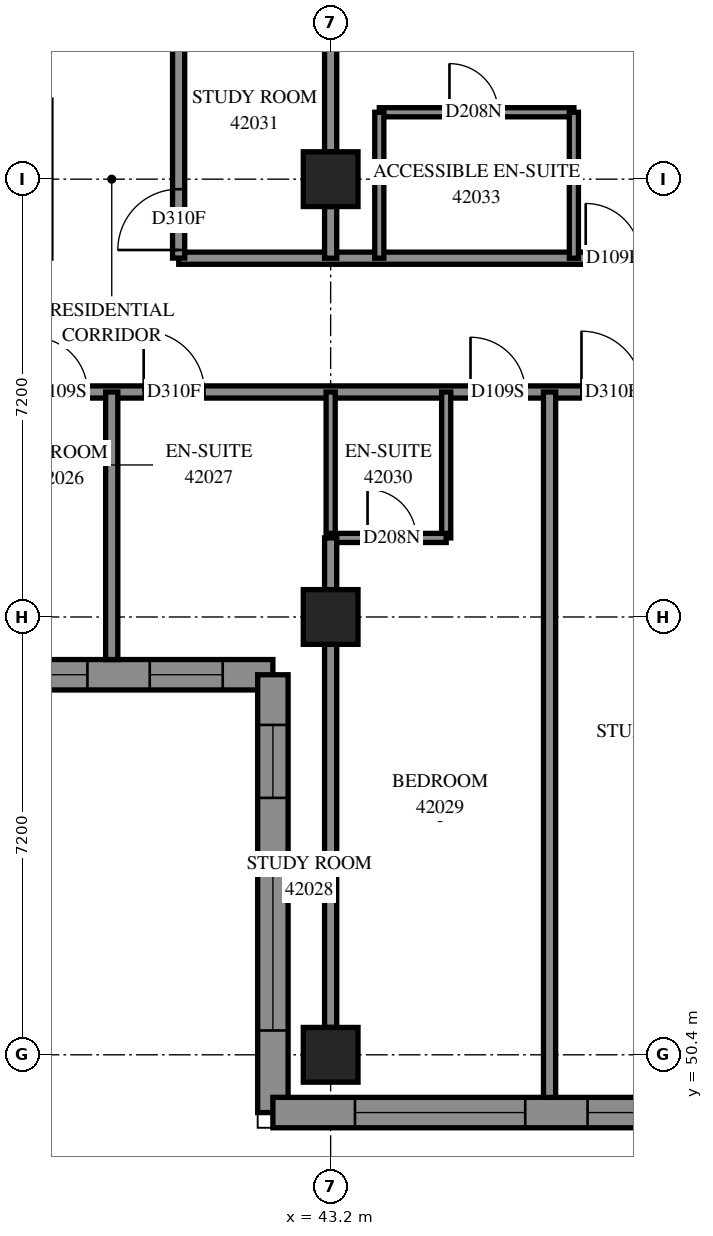
"""IFC4 building model, lengths in metres.
Left out: names, types, materials, properties, quantities, classifications, styles, units other than length and angle.
Written with IfcOpenShell. Run it as: python <this file> out.ifc"""

import sys

from ifc_helpers import new_model, si_unit, direction, frame, frame_2d, origin, origin_2d, place, context, subcontext, project, spatial, polyline, rectangle, outline, extrude, element, fill, save


model = new_model("IFC4")
c1 = context("Model", 3, precision=1e-05, world=origin(), true_north=direction((0.0, 1.0)))
c2 = subcontext(c1, "Body", "Model", "MODEL_VIEW")
j1 = project(units=[si_unit("LENGTHUNIT", "METRE"), si_unit("PLANEANGLEUNIT", "RADIAN")], contexts=[c1])
p1 = place(None, origin())
s1 = spatial("IfcSite", under=j1, at=p1, CompositionType="ELEMENT")
p2 = place(p1, origin())
s2 = spatial("IfcBuilding", under=s1, at=p2, CompositionType="ELEMENT")
p3 = place(p2, frame((0.0, 0.0, 155.8)))
s3 = spatial("IfcBuildingStorey", under=s2, at=p3, CompositionType="ELEMENT", Elevation=155.8)
for number, where, z_axis, x_axis in (
    (1, (43.2, 50.4, 0.0), (0.0, 0.0, 1.0), (1.0, 0.0, 0.0)),
    (2, (43.2, 57.6, 0.0), (0.0, 0.0, 1.0), (1.0, 0.0, 0.0)),
    (3, (43.2, 64.8, 0.0), (0.0, 0.0, 1.0), (1.0, 0.0, 0.0)),
):
    element("IfcColumn", number, at=place(p3, frame(where, z_axis=z_axis, x_axis=x_axis)), inside=s3, PredefinedType="COLUMN", context=c2, shape_type="SweptSolid", body=[
        extrude(rectangle(XDim=0.9, YDim=0.9, at=origin_2d()), origin(), (0.0, 0.0, 1.0), 3.1),
    ])
p4 = place(p3, frame((35.05, 56.65, 0.0), z_axis=(0.0, 0.0, 1.0), x_axis=(1.0, 0.0, 0.0)))
e4 = element("IfcWall", 4, at=p4, inside=s3, PredefinedType="SOLIDWALL", context=c2, shape_type="SweptSolid", body=[
    extrude(outline(polyline([(-0.25, -0.25), (6.95, -0.25), (7.45, 0.25), (0.25, 0.25), (-0.25, -0.25)])), origin(), (0.0, 0.0, 1.0), 3.1),
])
p5 = place(p4, frame((1.35, 0.0, 0.45)))
e5 = element("IfcOpeningElement", 5, at=p5, cuts=e4, PredefinedType="OPENING", context=c2, shape_type="SweptSolid", body=[
    extrude(rectangle(XDim=2.8, YDim=2.5, at=frame_2d((1.4, 1.25))), frame((0.0, 0.26, 0.0), z_axis=(0.0, -1.0, 0.0), x_axis=(1.0, 0.0, 0.0)), (0.0, 0.0, 1.0), 0.52),
])
p6 = place(p4, frame((5.175, 0.0, 0.45)))
e6 = element("IfcOpeningElement", 6, at=p6, cuts=e4, PredefinedType="OPENING", context=c2, shape_type="SweptSolid", body=[
    extrude(rectangle(XDim=1.2, YDim=2.5, at=frame_2d((0.6, 1.25))), frame((0.0, 0.26, 0.0), z_axis=(0.0, -1.0, 0.0), x_axis=(1.0, 0.0, 0.0)), (0.0, 0.0, 1.0), 0.52),
])
p7 = place(p3, frame((42.25, 56.65, 0.0), z_axis=(0.0, 0.0, 1.0), x_axis=(0.0, -1.0, 0.0)))
e7 = element("IfcWall", 7, at=p7, inside=s3, PredefinedType="SOLIDWALL", context=c2, shape_type="SweptSolid", body=[
    extrude(outline(polyline([(0.25, -0.25), (7.45, -0.25), (6.95, 0.25), (-0.25, 0.25), (0.25, -0.25)])), origin(), (0.0, 0.0, 1.0), 3.1),
])
p8 = place(p7, frame((3.05, 0.0, 0.45)))
e8 = element("IfcOpeningElement", 8, at=p8, cuts=e7, PredefinedType="OPENING", context=c2, shape_type="SweptSolid", body=[
    extrude(rectangle(XDim=2.8, YDim=2.5, at=frame_2d((1.4, 1.25))), frame((0.0, 0.26, 0.0), z_axis=(0.0, -1.0, 0.0), x_axis=(1.0, 0.0, 0.0)), (0.0, 0.0, 1.0), 0.52),
])
p9 = place(p7, frame((0.825, 0.0, 0.45)))
e9 = element("IfcOpeningElement", 9, at=p9, cuts=e7, PredefinedType="OPENING", context=c2, shape_type="SweptSolid", body=[
    extrude(rectangle(XDim=1.2, YDim=2.5, at=frame_2d((0.6, 1.25))), frame((0.0, 0.26, 0.0), z_axis=(0.0, -1.0, 0.0), x_axis=(1.0, 0.0, 0.0)), (0.0, 0.0, 1.0), 0.52),
])
p10 = place(p3, frame((42.25, 49.45, 0.0), z_axis=(0.0, 0.0, 1.0), x_axis=(1.0, 0.0, 0.0)))
e10 = element("IfcWall", 10, at=p10, inside=s3, PredefinedType="SOLIDWALL", context=c2, shape_type="SweptSolid", body=[
    extrude(outline(polyline([(-0.25, -0.25), (6.95, -0.25), (7.45, 0.25), (0.25, 0.25), (-0.25, -0.25)])), origin(), (0.0, 0.0, 1.0), 3.1),
])
p11 = place(p10, frame((1.35, 0.0, 0.45)))
e11 = element("IfcOpeningElement", 11, at=p11, cuts=e10, PredefinedType="OPENING", context=c2, shape_type="SweptSolid", body=[
    extrude(rectangle(XDim=2.8, YDim=2.5, at=frame_2d((1.4, 1.25))), frame((0.0, 0.26, 0.0), z_axis=(0.0, -1.0, 0.0), x_axis=(1.0, 0.0, 0.0)), (0.0, 0.0, 1.0), 0.52),
])
p12 = place(p10, frame((5.175, 0.0, 0.45)))
e12 = element("IfcOpeningElement", 12, at=p12, cuts=e10, PredefinedType="OPENING", context=c2, shape_type="SweptSolid", body=[
    extrude(rectangle(XDim=1.2, YDim=2.5, at=frame_2d((0.6, 1.25))), frame((0.0, 0.26, 0.0), z_axis=(0.0, -1.0, 0.0), x_axis=(1.0, 0.0, 0.0)), (0.0, 0.0, 1.0), 0.52),
])
p13 = place(p3, frame((36.0, 61.3, 0.0), z_axis=(0.0, 0.0, 1.0), x_axis=(1.0, 0.0, 0.0)))
e13 = element("IfcWall", 13, at=p13, inside=s3, PredefinedType="PARTITIONING", context=c2, shape_type="SweptSolid", body=[
    extrude(rectangle(XDim=16.9, YDim=0.2, at=frame_2d((8.45, 0.0))), origin(), (0.0, 0.0, 1.0), 3.1),
])
p14 = place(p13, frame((2.3, 0.0, 0.0)))
e14 = element("IfcOpeningElement", 14, at=p14, cuts=e13, PredefinedType="OPENING", context=c2, shape_type="SweptSolid", body=[
    extrude(rectangle(XDim=0.9, YDim=2.1, at=frame_2d((0.45, 1.05))), frame((0.0, 0.11, 0.0), z_axis=(0.0, -1.0, 0.0), x_axis=(1.0, 0.0, 0.0)), (0.0, 0.0, 1.0), 0.22),
])
p15 = place(p13, frame((4.125, 0.0, 0.0)))
e15 = element("IfcOpeningElement", 15, at=p15, cuts=e13, PredefinedType="OPENING", context=c2, shape_type="SweptSolid", body=[
    extrude(rectangle(XDim=1.0, YDim=2.1, at=frame_2d((0.5, 1.05))), frame((0.0, 0.11, 0.0), z_axis=(0.0, -1.0, 0.0), x_axis=(1.0, 0.0, 0.0)), (0.0, 0.0, 1.0), 0.22),
])
p16 = place(p13, frame((9.5, 0.0, 0.0)))
e16 = element("IfcOpeningElement", 16, at=p16, cuts=e13, PredefinedType="OPENING", context=c2, shape_type="SweptSolid", body=[
    extrude(rectangle(XDim=0.9, YDim=2.1, at=frame_2d((0.45, 1.05))), frame((0.0, 0.11, 0.0), z_axis=(0.0, -1.0, 0.0), x_axis=(1.0, 0.0, 0.0)), (0.0, 0.0, 1.0), 0.22),
])
p17 = place(p13, frame((11.325, 0.0, 0.0)))
e17 = element("IfcOpeningElement", 17, at=p17, cuts=e13, PredefinedType="OPENING", context=c2, shape_type="SweptSolid", body=[
    extrude(rectangle(XDim=1.0, YDim=2.1, at=frame_2d((0.5, 1.05))), frame((0.0, 0.11, 0.0), z_axis=(0.0, -1.0, 0.0), x_axis=(1.0, 0.0, 0.0)), (0.0, 0.0, 1.0), 0.22),
])
p18 = place(p13, frame((15.647, 0.0, 0.0)))
e18 = element("IfcOpeningElement", 18, at=p18, cuts=e13, PredefinedType="OPENING", context=c2, shape_type="SweptSolid", body=[
    extrude(rectangle(XDim=1.0, YDim=2.1, at=frame_2d((0.5, 1.05))), frame((0.0, 0.11, 0.0), z_axis=(0.0, -1.0, 0.0), x_axis=(1.0, 0.0, 0.0)), (0.0, 0.0, 1.0), 0.22),
])
p19 = place(p3, frame((40.702, 63.5, 0.0), z_axis=(0.0, 0.0, 1.0), x_axis=(1.0, 0.0, 0.0)))
e19 = element("IfcWall", 19, at=p19, inside=s3, PredefinedType="PARTITIONING", context=c2, shape_type="SweptSolid", body=[
    extrude(rectangle(XDim=14.198, YDim=0.2, at=frame_2d((7.099, 0.0))), origin(), (0.0, 0.0, 1.0), 3.1),
])
p20 = place(p19, frame((6.692, 0.0, 0.0)))
e20 = element("IfcOpeningElement", 20, at=p20, cuts=e19, PredefinedType="OPENING", context=c2, shape_type="SweptSolid", body=[
    extrude(rectangle(XDim=0.9, YDim=2.1, at=frame_2d((0.45, 1.05))), frame((0.0, 0.11, 0.0), z_axis=(0.0, -1.0, 0.0), x_axis=(1.0, 0.0, 0.0)), (0.0, 0.0, 1.0), 0.22),
])
p21 = place(p19, frame((10.25, 0.0, 0.0)))
e21 = element("IfcOpeningElement", 21, at=p21, cuts=e19, PredefinedType="OPENING", context=c2, shape_type="SweptSolid", body=[
    extrude(rectangle(XDim=0.9, YDim=2.1, at=frame_2d((0.45, 1.05))), frame((0.0, 0.11, 0.0), z_axis=(0.0, -1.0, 0.0), x_axis=(1.0, 0.0, 0.0)), (0.0, 0.0, 1.0), 0.22),
])
p22 = place(p3, frame((46.8, 49.7, 0.0), z_axis=(0.0, 0.0, 1.0), x_axis=(0.0, 1.0, 0.0)))
e22 = element("IfcWall", 22, at=p22, inside=s3, PredefinedType="PARTITIONING", context=c2, shape_type="SweptSolid", body=[
    extrude(rectangle(XDim=11.6, YDim=0.2, at=frame_2d((5.8, 0.0))), origin(), (0.0, 0.0, 1.0), 3.1),
])
p23 = place(p3, frame((43.2, 50.85, 0.0), z_axis=(0.0, 0.0, 1.0), x_axis=(0.0, 1.0, 0.0)))
e23 = element("IfcWall", 23, at=p23, inside=s3, PredefinedType="PARTITIONING", context=c2, shape_type="SweptSolid", body=[
    extrude(rectangle(XDim=6.3, YDim=0.2, at=frame_2d((3.15, 0.0))), origin(), (0.0, 0.0, 1.0), 2.6),
])
p24 = place(p3, frame((43.2, 65.25, 0.0), z_axis=(0.0, 0.0, 1.0), x_axis=(0.0, 1.0, 0.0)))
e24 = element("IfcWall", 24, at=p24, inside=s3, PredefinedType="PARTITIONING", context=c2, shape_type="SweptSolid", body=[
    extrude(rectangle(XDim=6.3, YDim=0.2, at=frame_2d((3.15, 0.0))), origin(), (0.0, 0.0, 1.0), 3.1),
])
p25 = place(p3, frame((40.7, 63.502, 0.0), z_axis=(0.0, 0.0, 1.0), x_axis=(0.0, 1.0, 0.0)))
e25 = element("IfcWall", 25, at=p25, inside=s3, PredefinedType="PARTITIONING", context=c2, shape_type="SweptSolid", body=[
    extrude(rectangle(XDim=4.798, YDim=0.2, at=frame_2d((2.399, 0.0))), origin(), (0.0, 0.0, 1.0), 3.1),
])
p26 = place(p25, frame((0.133, 0.0, 0.0)))
e26 = element("IfcOpeningElement", 26, at=p26, cuts=e25, PredefinedType="OPENING", context=c2, shape_type="SweptSolid", body=[
    extrude(rectangle(XDim=1.0, YDim=2.1, at=frame_2d((0.5, 1.05))), frame((0.0, 0.11, 0.0), z_axis=(0.0, -1.0, 0.0), x_axis=(1.0, 0.0, 0.0)), (0.0, 0.0, 1.0), 0.22),
])
p27 = place(p3, frame((39.6, 56.9, 0.0), z_axis=(0.0, 0.0, 1.0), x_axis=(0.0, 1.0, 0.0)))
e27 = element("IfcWall", 27, at=p27, inside=s3, PredefinedType="PARTITIONING", context=c2, shape_type="SweptSolid", body=[
    extrude(rectangle(XDim=4.4, YDim=0.2, at=frame_2d((2.2, 0.0))), origin(), (0.0, 0.0, 1.0), 3.1),
])
p28 = place(p3, frame((44.0, 65.9, 0.0), z_axis=(0.0, 0.0, 1.0), x_axis=(1.0, 0.0, 0.0)))
e28 = element("IfcWall", 28, at=p28, inside=s3, PredefinedType="PARTITIONING", context=c2, shape_type="SweptSolid", body=[
    extrude(rectangle(XDim=3.2, YDim=0.15, at=frame_2d((1.6, 0.0))), origin(), (0.0, 0.0, 1.0), 3.1),
])
p29 = place(p28, frame((1.154, 0.0, 0.0)))
e29 = element("IfcOpeningElement", 29, at=p29, cuts=e28, PredefinedType="OPENING", context=c2, shape_type="SweptSolid", body=[
    extrude(rectangle(XDim=0.8, YDim=2.1, at=frame_2d((0.4, 1.05))), frame((0.0, 0.085, 0.0), z_axis=(0.0, -1.0, 0.0), x_axis=(1.0, 0.0, 0.0)), (0.0, 0.0, 1.0), 0.17),
])
for number, where, z_axis, x_axis in (
    (30, (44.0, 63.5, 0.0), (0.0, 0.0, 1.0), (0.0, 1.0, 0.0)),
    (31, (47.2, 63.5, 0.0), (0.0, 0.0, 1.0), (0.0, 1.0, 0.0)),
    (32, (45.1, 58.9, 0.0), (0.0, 0.0, 1.0), (0.0, 1.0, 0.0)),
    (33, (43.2, 58.9, 0.0), (0.0, 0.0, 1.0), (0.0, 1.0, 0.0)),
):
    element("IfcWall", number, at=place(p3, frame(where, z_axis=z_axis, x_axis=x_axis)), inside=s3, PredefinedType="PARTITIONING", context=c2, shape_type="SweptSolid", body=[
        extrude(rectangle(XDim=2.4, YDim=0.15, at=frame_2d((1.2, 0.0))), origin(), (0.0, 0.0, 1.0), 3.1),
    ])
p30 = place(p3, frame((43.2, 58.9, 0.0), z_axis=(0.0, 0.0, 1.0), x_axis=(1.0, 0.0, 0.0)))
e34 = element("IfcWall", 34, at=p30, inside=s3, PredefinedType="PARTITIONING", context=c2, shape_type="SweptSolid", body=[
    extrude(rectangle(XDim=1.9, YDim=0.15, at=frame_2d((0.95, 0.0))), origin(), (0.0, 0.0, 1.0), 3.1),
])
p31 = place(p30, frame((0.607, 0.0, 0.0)))
e35 = element("IfcOpeningElement", 35, at=p31, cuts=e34, PredefinedType="OPENING", context=c2, shape_type="SweptSolid", body=[
    extrude(rectangle(XDim=0.8, YDim=2.1, at=frame_2d((0.4, 1.05))), frame((0.0, 0.085, 0.0), z_axis=(0.0, -1.0, 0.0), x_axis=(1.0, 0.0, 0.0)), (0.0, 0.0, 1.0), 0.17),
])
for number, where, z_axis, x_axis in (
    (36, (43.2, 58.05, 0.0), (0.0, 0.0, 1.0), (0.0, 1.0, 0.0)),
    (37, (43.2, 63.5, 0.0), (0.0, 0.0, 1.0), (0.0, 1.0, 0.0)),
):
    element("IfcWall", number, at=place(p3, frame(where, z_axis=z_axis, x_axis=x_axis)), inside=s3, PredefinedType="PARTITIONING", context=c2, shape_type="SweptSolid", body=[
        extrude(rectangle(XDim=0.85, YDim=0.2, at=frame_2d((0.425, 0.0))), origin(), (0.0, 0.0, 1.0), 3.1),
    ])
p32 = place(p5, origin())
e38 = element("IfcWindow", 38, at=p32, inside=s3, PartitioningType="SINGLE_PANEL", PredefinedType="WINDOW", context=c2, shape_type="SweptSolid", body=[
    extrude(rectangle(XDim=2.8, YDim=2.5, at=frame_2d((1.4, 1.25))), frame((0.0, 0.18, 0.0), z_axis=(0.0, -1.0, 0.0), x_axis=(1.0, 0.0, 0.0)), (0.0, 0.0, 1.0), 0.06),
])
fill(e5, e38)
p33 = place(p6, origin())
e39 = element("IfcWindow", 39, at=p33, inside=s3, PartitioningType="SINGLE_PANEL", PredefinedType="WINDOW", context=c2, shape_type="SweptSolid", body=[
    extrude(rectangle(XDim=1.2, YDim=2.5, at=frame_2d((0.6, 1.25))), frame((0.0, 0.18, 0.0), z_axis=(0.0, -1.0, 0.0), x_axis=(1.0, 0.0, 0.0)), (0.0, 0.0, 1.0), 0.06),
])
fill(e6, e39)
p34 = place(p8, origin())
e40 = element("IfcWindow", 40, at=p34, inside=s3, PartitioningType="SINGLE_PANEL", PredefinedType="WINDOW", context=c2, shape_type="SweptSolid", body=[
    extrude(rectangle(XDim=2.8, YDim=2.5, at=frame_2d((1.4, 1.25))), frame((0.0, 0.18, 0.0), z_axis=(0.0, -1.0, 0.0), x_axis=(1.0, 0.0, 0.0)), (0.0, 0.0, 1.0), 0.06),
])
fill(e8, e40)
p35 = place(p9, origin())
e41 = element("IfcWindow", 41, at=p35, inside=s3, PartitioningType="SINGLE_PANEL", PredefinedType="WINDOW", context=c2, shape_type="SweptSolid", body=[
    extrude(rectangle(XDim=1.2, YDim=2.5, at=frame_2d((0.6, 1.25))), frame((0.0, 0.18, 0.0), z_axis=(0.0, -1.0, 0.0), x_axis=(1.0, 0.0, 0.0)), (0.0, 0.0, 1.0), 0.06),
])
fill(e9, e41)
p36 = place(p11, origin())
e42 = element("IfcWindow", 42, at=p36, inside=s3, PartitioningType="SINGLE_PANEL", PredefinedType="WINDOW", context=c2, shape_type="SweptSolid", body=[
    extrude(rectangle(XDim=2.8, YDim=2.5, at=frame_2d((1.4, 1.25))), frame((0.0, 0.18, 0.0), z_axis=(0.0, -1.0, 0.0), x_axis=(1.0, 0.0, 0.0)), (0.0, 0.0, 1.0), 0.06),
])
fill(e11, e42)
p37 = place(p12, origin())
e43 = element("IfcWindow", 43, at=p37, inside=s3, PartitioningType="SINGLE_PANEL", PredefinedType="WINDOW", context=c2, shape_type="SweptSolid", body=[
    extrude(rectangle(XDim=1.2, YDim=2.5, at=frame_2d((0.6, 1.25))), frame((0.0, 0.18, 0.0), z_axis=(0.0, -1.0, 0.0), x_axis=(1.0, 0.0, 0.0)), (0.0, 0.0, 1.0), 0.06),
])
fill(e12, e43)
p38 = place(p14, origin())
e44 = element("IfcDoor", 44, at=p38, inside=s3, OperationType="SINGLE_SWING_LEFT", PredefinedType="DOOR", context=c2, shape_type="SweptSolid", body=[
    extrude(rectangle(XDim=0.9, YDim=2.1, at=frame_2d((0.45, 1.05))), frame((0.0, 0.025, 0.0), z_axis=(0.0, -1.0, 0.0), x_axis=(1.0, 0.0, 0.0)), (0.0, 0.0, 1.0), 0.05),
])
fill(e14, e44)
p39 = place(p15, origin())
e45 = element("IfcDoor", 45, at=p39, inside=s3, OperationType="SINGLE_SWING_RIGHT", PredefinedType="DOOR", context=c2, shape_type="SweptSolid", body=[
    extrude(rectangle(XDim=1.0, YDim=2.1, at=frame_2d((0.5, 1.05))), frame((0.0, 0.025, 0.0), z_axis=(0.0, -1.0, 0.0), x_axis=(1.0, 0.0, 0.0)), (0.0, 0.0, 1.0), 0.05),
])
fill(e15, e45)
p40 = place(p16, origin())
e46 = element("IfcDoor", 46, at=p40, inside=s3, OperationType="SINGLE_SWING_LEFT", PredefinedType="DOOR", context=c2, shape_type="SweptSolid", body=[
    extrude(rectangle(XDim=0.9, YDim=2.1, at=frame_2d((0.45, 1.05))), frame((0.0, 0.025, 0.0), z_axis=(0.0, -1.0, 0.0), x_axis=(1.0, 0.0, 0.0)), (0.0, 0.0, 1.0), 0.05),
])
fill(e16, e46)
p41 = place(p31, origin())
e47 = element("IfcDoor", 47, at=p41, inside=s3, OperationType="SINGLE_SWING_RIGHT", PredefinedType="DOOR", context=c2, shape_type="SweptSolid", body=[
    extrude(rectangle(XDim=0.8, YDim=2.1, at=frame_2d((0.4, 1.05))), frame((0.0, 0.025, 0.0), z_axis=(0.0, -1.0, 0.0), x_axis=(1.0, 0.0, 0.0)), (0.0, 0.0, 1.0), 0.05),
])
fill(e35, e47)
p42 = place(p26, origin())
e48 = element("IfcDoor", 48, at=p42, inside=s3, OperationType="SINGLE_SWING_LEFT", PredefinedType="DOOR", context=c2, shape_type="SweptSolid", body=[
    extrude(rectangle(XDim=1.0, YDim=2.1, at=frame_2d((0.5, 1.05))), frame((0.0, 0.025, 0.0), z_axis=(0.0, -1.0, 0.0), x_axis=(1.0, 0.0, 0.0)), (0.0, 0.0, 1.0), 0.05),
])
fill(e26, e48)
p43 = place(p20, origin())
e49 = element("IfcDoor", 49, at=p43, inside=s3, OperationType="SINGLE_SWING_RIGHT", PredefinedType="DOOR", context=c2, shape_type="SweptSolid", body=[
    extrude(rectangle(XDim=0.9, YDim=2.1, at=frame_2d((0.45, 1.05))), frame((0.0, 0.025, 0.0), z_axis=(0.0, -1.0, 0.0), x_axis=(1.0, 0.0, 0.0)), (0.0, 0.0, 1.0), 0.05),
])
fill(e20, e49)
p44 = place(p29, origin())
e50 = element("IfcDoor", 50, at=p44, inside=s3, OperationType="SINGLE_SWING_RIGHT", PredefinedType="DOOR", context=c2, shape_type="SweptSolid", body=[
    extrude(rectangle(XDim=0.8, YDim=2.1, at=frame_2d((0.4, 1.05))), frame((0.0, 0.025, 0.0), z_axis=(0.0, -1.0, 0.0), x_axis=(1.0, 0.0, 0.0)), (0.0, 0.0, 1.0), 0.05),
])
fill(e29, e50)
p45 = place(p17, origin())
e51 = element("IfcDoor", 51, at=p45, inside=s3, OperationType="SINGLE_SWING_RIGHT", PredefinedType="DOOR", context=c2, shape_type="SweptSolid", body=[
    extrude(rectangle(XDim=1.0, YDim=2.1, at=frame_2d((0.5, 1.05))), frame((0.0, 0.025, 0.0), z_axis=(0.0, -1.0, 0.0), x_axis=(1.0, 0.0, 0.0)), (0.0, 0.0, 1.0), 0.05),
])
fill(e17, e51)
save(model, sys.argv[1])
